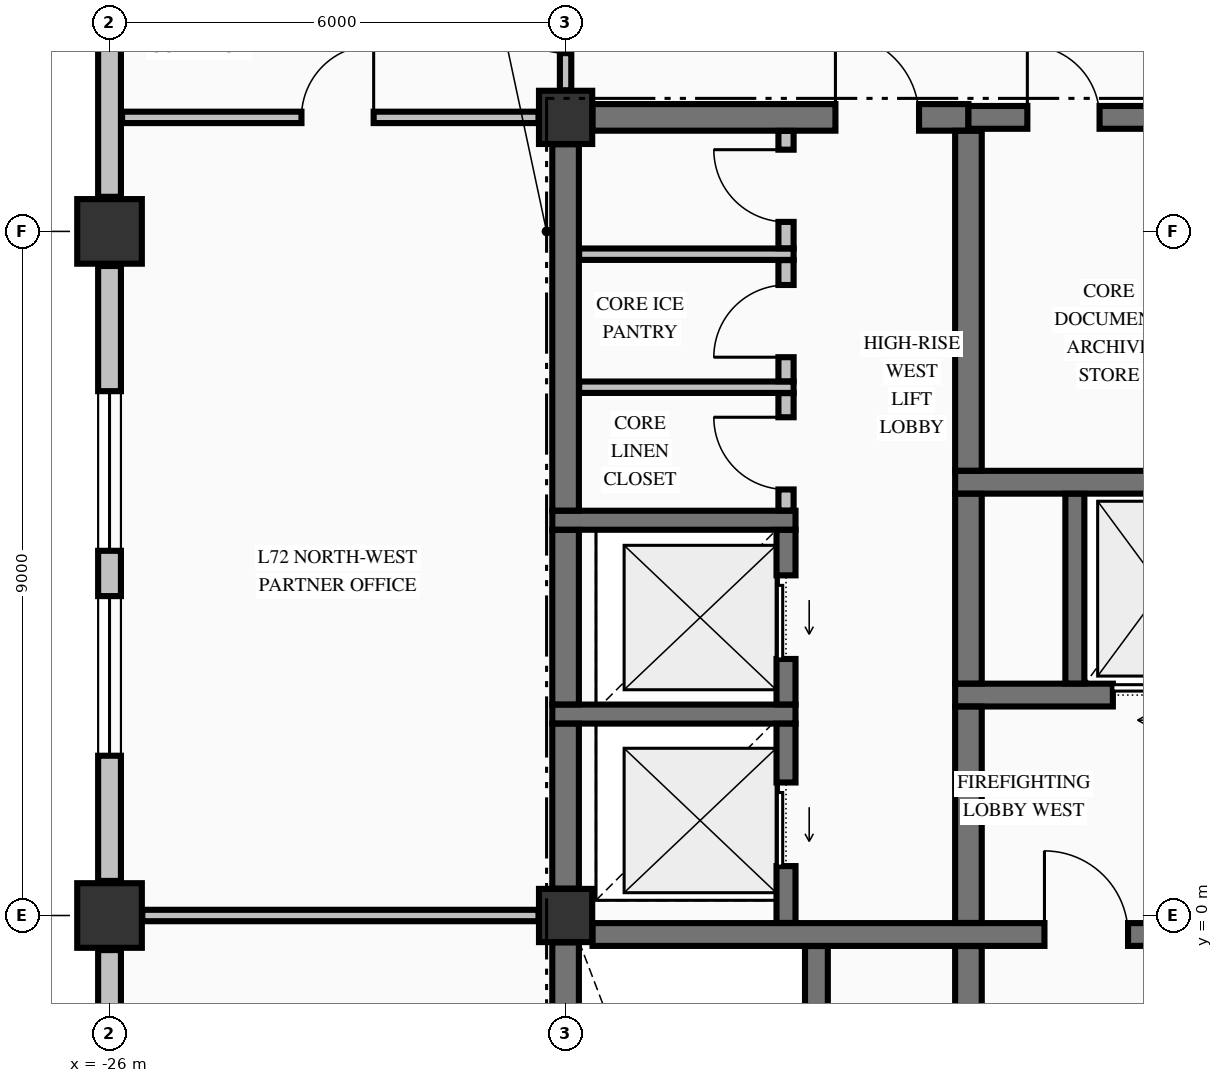
"""IFC4 building model, lengths in metres.
Left out: names, types, materials, properties, quantities, classifications, styles, units other than length and angle.
Written with IfcOpenShell. Run it as: python <this file> out.ifc"""

import sys

from ifc_helpers import new_model, si_unit, direction, frame, frame_2d, origin, origin_2d, place, context, subcontext, project, spatial, rectangle, extrude, element, fill, save


model = new_model("IFC4")
c1 = context("Model", 3, precision=1e-05, world=origin(), true_north=direction((0.0, 1.0)))
c2 = subcontext(c1, "Body", "Model", "MODEL_VIEW")
j1 = project(units=[si_unit("LENGTHUNIT", "METRE"), si_unit("PLANEANGLEUNIT", "RADIAN")], contexts=[c1])
p1 = place(None, origin())
s1 = spatial("IfcSite", under=j1, at=p1, CompositionType="ELEMENT")
p2 = place(p1, origin())
s2 = spatial("IfcBuilding", under=s1, at=p2, CompositionType="ELEMENT")
p3 = place(p2, frame((0.0, 0.0, 270.58)))
s3 = spatial("IfcBuildingStorey", under=s2, at=p3, CompositionType="ELEMENT", Elevation=270.58)
for number, where, z_axis, x_axis in (
    (1, (-26.0, 0.0, -0.325), (0.0, 0.0, 1.0), (1.0, 0.0, 0.0)),
    (2, (-26.0, 9.0, -0.325), (0.0, 0.0, 1.0), (1.0, 0.0, 0.0)),
):
    element("IfcColumn", number, at=place(p3, frame(where, z_axis=z_axis, x_axis=x_axis)), inside=s3, PredefinedType="COLUMN", context=c2, shape_type="SweptSolid", body=[
        extrude(rectangle(XDim=0.85, YDim=0.85, at=origin_2d()), origin(), (0.0, 0.0, 1.0), 3.815),
    ])
for number, where, z_axis, x_axis in (
    (3, (-20.0, 10.5, -0.325), (0.0, 0.0, 1.0), (1.0, 0.0, 0.0)),
    (4, (-20.0, 0.0, -0.325), (0.0, 0.0, 1.0), (1.0, 0.0, 0.0)),
):
    element("IfcColumn", number, at=place(p3, frame(where, z_axis=z_axis, x_axis=x_axis)), inside=s3, PredefinedType="COLUMN", context=c2, shape_type="SweptSolid", body=[
        extrude(rectangle(XDim=0.7, YDim=0.7, at=origin_2d()), origin(), (0.0, 0.0, 1.0), 3.815),
    ])
p4 = place(p3, frame((-26.0, -0.455, 0.0), z_axis=(0.0, 0.0, 1.0), x_axis=(0.0, -1.0, 0.0)))
e5 = element("IfcWall", 5, at=p4, inside=s3, PredefinedType="STANDARD", context=c2, shape_type="SweptSolid", body=[
    extrude(rectangle(XDim=8.09, YDim=0.3, at=frame_2d((4.045, 0.0))), origin(), (0.0, 0.0, 1.0), 2.882),
])
p5 = place(p4, frame((1.647, 0.0, 0.7)))
e6 = element("IfcOpeningElement", 6, at=p5, cuts=e5, PredefinedType="OPENING", context=c2, shape_type="SweptSolid", body=[
    extrude(rectangle(XDim=2.1, YDim=1.5, at=frame_2d((1.05, 0.75))), frame((0.0, 0.16, 0.0), z_axis=(0.0, -1.0, 0.0), x_axis=(1.0, 0.0, 0.0)), (0.0, 0.0, 1.0), 0.32),
])
p6 = place(p4, frame((4.343, 0.0, 0.7)))
e7 = element("IfcOpeningElement", 7, at=p6, cuts=e5, PredefinedType="OPENING", context=c2, shape_type="SweptSolid", body=[
    extrude(rectangle(XDim=2.1, YDim=1.5, at=frame_2d((1.05, 0.75))), frame((0.0, 0.16, 0.0), z_axis=(0.0, -1.0, 0.0), x_axis=(1.0, 0.0, 0.0)), (0.0, 0.0, 1.0), 0.32),
])
p7 = place(p3, frame((-26.0, 8.545, 0.0), z_axis=(0.0, 0.0, 1.0), x_axis=(0.0, -1.0, 0.0)))
e8 = element("IfcWall", 8, at=p7, inside=s3, PredefinedType="STANDARD", context=c2, shape_type="SweptSolid", body=[
    extrude(rectangle(XDim=8.09, YDim=0.3, at=frame_2d((4.045, 0.0))), origin(), (0.0, 0.0, 1.0), 2.882),
])
p8 = place(p7, frame((1.647, 0.0, 0.7)))
e9 = element("IfcOpeningElement", 9, at=p8, cuts=e8, PredefinedType="OPENING", context=c2, shape_type="SweptSolid", body=[
    extrude(rectangle(XDim=2.1, YDim=1.5, at=frame_2d((1.05, 0.75))), frame((0.0, 0.16, 0.0), z_axis=(0.0, -1.0, 0.0), x_axis=(1.0, 0.0, 0.0)), (0.0, 0.0, 1.0), 0.32),
])
p9 = place(p7, frame((4.343, 0.0, 0.7)))
e10 = element("IfcOpeningElement", 10, at=p9, cuts=e8, PredefinedType="OPENING", context=c2, shape_type="SweptSolid", body=[
    extrude(rectangle(XDim=2.1, YDim=1.5, at=frame_2d((1.05, 0.75))), frame((0.0, 0.16, 0.0), z_axis=(0.0, -1.0, 0.0), x_axis=(1.0, 0.0, 0.0)), (0.0, 0.0, 1.0), 0.32),
])
p10 = place(p3, frame((-26.0, 17.545, 0.0), z_axis=(0.0, 0.0, 1.0), x_axis=(0.0, -1.0, 0.0)))
e11 = element("IfcWall", 11, at=p10, inside=s3, PredefinedType="STANDARD", context=c2, shape_type="SweptSolid", body=[
    extrude(rectangle(XDim=8.09, YDim=0.3, at=frame_2d((4.045, 0.0))), origin(), (0.0, 0.0, 1.0), 2.882),
])
p11 = place(p3, frame((-19.646, -0.25, 0.0), z_axis=(0.0, 0.0, 1.0), x_axis=(1.0, 0.0, 0.0)))
e12 = element("IfcWall", 12, at=p11, inside=s3, PredefinedType="SHEAR", context=c2, shape_type="SweptSolid", body=[
    extrude(rectangle(XDim=8.292, YDim=0.3, at=frame_2d((4.146, 0.0))), origin(), (0.0, 0.0, 1.0), 3.49),
])
p12 = place(p11, frame((5.946, 0.0, 0.0)))
e13 = element("IfcOpeningElement", 13, at=p12, cuts=e12, PredefinedType="OPENING", context=c2, shape_type="SweptSolid", body=[
    extrude(rectangle(XDim=1.1, YDim=2.15, at=frame_2d((0.55, 1.075))), frame((0.0, 0.16, 0.0), z_axis=(0.0, -1.0, 0.0), x_axis=(1.0, 0.0, 0.0)), (0.0, 0.0, 1.0), 0.32),
])
p13 = place(p3, frame((-20.175, 2.65, 0.0), z_axis=(0.0, 0.0, 1.0), x_axis=(1.0, 0.0, 0.0)))
e14 = element("IfcWall", 14, at=p13, inside=s3, PredefinedType="SOLIDWALL", context=c2, shape_type="SweptSolid", body=[
    extrude(rectangle(XDim=3.2, YDim=0.25, at=frame_2d((1.6, 0.0))), origin(), (0.0, 0.0, 1.0), 3.49),
])
p14 = place(p3, frame((-14.875, 2.9, 0.0), z_axis=(0.0, 0.0, 1.0), x_axis=(1.0, 0.0, 0.0)))
e15 = element("IfcWall", 15, at=p14, inside=s3, PredefinedType="SHEAR", context=c2, shape_type="SweptSolid", body=[
    extrude(rectangle(XDim=4.025, YDim=0.3, at=frame_2d((2.012, 0.0))), origin(), (0.0, 0.0, 1.0), 3.49),
])
p15 = place(p14, frame((2.075, 0.0, 0.0)))
e16 = element("IfcOpeningElement", 16, at=p15, cuts=e15, PredefinedType="OPENING", context=c2, shape_type="SweptSolid", body=[
    extrude(rectangle(XDim=1.1, YDim=2.2, at=frame_2d((0.55, 1.1))), frame((0.0, 0.16, 0.0), z_axis=(0.0, -1.0, 0.0), x_axis=(1.0, 0.0, 0.0)), (0.0, 0.0, 1.0), 0.32),
])
p16 = place(p3, frame((-20.175, 5.2, 0.0), z_axis=(0.0, 0.0, 1.0), x_axis=(1.0, 0.0, 0.0)))
e17 = element("IfcWall", 17, at=p16, inside=s3, PredefinedType="SOLIDWALL", context=c2, shape_type="SweptSolid", body=[
    extrude(rectangle(XDim=3.2, YDim=0.25, at=frame_2d((1.6, 0.0))), origin(), (0.0, 0.0, 1.0), 3.49),
])
p17 = place(p3, frame((-14.875, 5.7, 0.0), z_axis=(0.0, 0.0, 1.0), x_axis=(1.0, 0.0, 0.0)))
e18 = element("IfcWall", 18, at=p17, inside=s3, PredefinedType="SHEAR", context=c2, shape_type="SweptSolid", body=[
    extrude(rectangle(XDim=4.025, YDim=0.3, at=frame_2d((2.012, 0.0))), origin(), (0.0, 0.0, 1.0), 3.49),
])
p18 = place(p3, frame((-19.646, 10.5, 0.0), z_axis=(0.0, 0.0, 1.0), x_axis=(1.0, 0.0, 0.0)))
e19 = element("IfcWall", 19, at=p18, inside=s3, PredefinedType="SHEAR", context=c2, shape_type="SweptSolid", body=[
    extrude(rectangle(XDim=4.946, YDim=0.35, at=frame_2d((2.473, 0.0))), origin(), (0.0, 0.0, 1.0), 3.49),
])
p19 = place(p18, frame((3.196, 0.0, 0.0)))
e20 = element("IfcOpeningElement", 20, at=p19, cuts=e19, PredefinedType="OPENING", context=c2, shape_type="SweptSolid", body=[
    extrude(rectangle(XDim=1.1, YDim=2.15, at=frame_2d((0.55, 1.075))), frame((0.0, 0.185, 0.0), z_axis=(0.0, -1.0, 0.0), x_axis=(1.0, 0.0, 0.0)), (0.0, 0.0, 1.0), 0.37),
])
p20 = place(p3, frame((-14.7, 10.5, 0.0), z_axis=(0.0, 0.0, 1.0), x_axis=(1.0, 0.0, 0.0)))
e21 = element("IfcWall", 21, at=p20, inside=s3, PredefinedType="SHEAR", context=c2, shape_type="SweptSolid", body=[
    extrude(rectangle(XDim=3.346, YDim=0.3, at=frame_2d((1.673, 0.0))), origin(), (0.0, 0.0, 1.0), 3.49),
])
p21 = place(p20, frame((0.775, 0.0, 0.0)))
e22 = element("IfcOpeningElement", 22, at=p21, cuts=e21, PredefinedType="OPENING", context=c2, shape_type="SweptSolid", body=[
    extrude(rectangle(XDim=0.95, YDim=2.15, at=frame_2d((0.475, 1.075))), frame((0.0, 0.16, 0.0), z_axis=(0.0, -1.0, 0.0), x_axis=(1.0, 0.0, 0.0)), (0.0, 0.0, 1.0), 0.32),
])
p22 = place(p3, frame((-25.569, 0.0, 0.0), z_axis=(0.0, 0.0, 1.0), x_axis=(1.0, 0.0, 0.0)))
e23 = element("IfcWall", 23, at=p22, inside=s3, PredefinedType="PARTITIONING", context=c2, shape_type="SweptSolid", body=[
    extrude(rectangle(XDim=5.213, YDim=0.15, at=frame_2d((2.606, 0.0))), origin(), (0.0, 0.0, 1.0), 3.08),
])
for number, where, z_axis, x_axis in (
    (24, (-19.822, 6.95, 0.0), (0.0, 0.0, 1.0), (1.0, 0.0, 0.0)),
    (25, (-19.822, 8.7, 0.0), (0.0, 0.0, 1.0), (1.0, 0.0, 0.0)),
):
    element("IfcWall", number, at=place(p3, frame(where, z_axis=z_axis, x_axis=x_axis)), inside=s3, PredefinedType="PARTITIONING", context=c2, shape_type="SweptSolid", body=[
        extrude(rectangle(XDim=2.822, YDim=0.15, at=frame_2d((1.411, 0.0))), origin(), (0.0, 0.0, 1.0), 3.49),
    ])
p23 = place(p3, frame((-25.835, 10.5, 0.0), z_axis=(0.0, 0.0, 1.0), x_axis=(1.0, 0.0, 0.0)))
e26 = element("IfcWall", 26, at=p23, inside=s3, PredefinedType="PARTITIONING", context=c2, shape_type="SweptSolid", body=[
    extrude(rectangle(XDim=5.479, YDim=0.15, at=frame_2d((2.74, 0.0))), origin(), (0.0, 0.0, 1.0), 3.49),
])
p24 = place(p23, frame((2.36, 0.0, 0.0)))
e27 = element("IfcOpeningElement", 27, at=p24, cuts=e26, PredefinedType="OPENING", context=c2, shape_type="SweptSolid", body=[
    extrude(rectangle(XDim=0.95, YDim=2.15, at=frame_2d((0.475, 1.075))), frame((0.0, 0.085, 0.0), z_axis=(0.0, -1.0, 0.0), x_axis=(1.0, 0.0, 0.0)), (0.0, 0.0, 1.0), 0.17),
])
p25 = place(p3, frame((-20.0, -9.596, 0.0), z_axis=(0.0, 0.0, 1.0), x_axis=(0.0, 1.0, 0.0)))
e28 = element("IfcWall", 28, at=p25, inside=s3, PredefinedType="SHEAR", context=c2, shape_type="SweptSolid", body=[
    extrude(rectangle(XDim=9.242, YDim=0.35, at=frame_2d((4.621, 0.0))), origin(), (0.0, 0.0, 1.0), 3.49),
])
p26 = place(p3, frame((-20.0, 0.354, 0.0), z_axis=(0.0, 0.0, 1.0), x_axis=(0.0, 1.0, 0.0)))
e29 = element("IfcWall", 29, at=p26, inside=s3, PredefinedType="SHEAR", context=c2, shape_type="SweptSolid", body=[
    extrude(rectangle(XDim=2.169, YDim=0.35, at=frame_2d((1.084, 0.0))), origin(), (0.0, 0.0, 1.0), 3.49),
])
p27 = place(p3, frame((-20.0, 2.777, 0.0), z_axis=(0.0, 0.0, 1.0), x_axis=(0.0, 1.0, 0.0)))
e30 = element("IfcWall", 30, at=p27, inside=s3, PredefinedType="SHEAR", context=c2, shape_type="SweptSolid", body=[
    extrude(rectangle(XDim=2.296, YDim=0.35, at=frame_2d((1.148, 0.0))), origin(), (0.0, 0.0, 1.0), 3.49),
])
p28 = place(p3, frame((-20.0, 5.327, 0.0), z_axis=(0.0, 0.0, 1.0), x_axis=(0.0, 1.0, 0.0)))
e31 = element("IfcWall", 31, at=p28, inside=s3, PredefinedType="SHEAR", context=c2, shape_type="SweptSolid", body=[
    extrude(rectangle(XDim=4.819, YDim=0.35, at=frame_2d((2.41, 0.0))), origin(), (0.0, 0.0, 1.0), 3.49),
])
p29 = place(p3, frame((-17.1, -0.098, 0.0), z_axis=(0.0, 0.0, 1.0), x_axis=(0.0, 1.0, 0.0)))
e32 = element("IfcWall", 32, at=p29, inside=s3, PredefinedType="SOLIDWALL", context=c2, shape_type="SweptSolid", body=[
    extrude(rectangle(XDim=2.621, YDim=0.25, at=frame_2d((1.311, 0.0))), origin(), (0.0, 0.0, 1.0), 3.49),
])
p30 = place(p29, frame((0.748, 0.0, 0.0)))
e33 = element("IfcOpeningElement", 33, at=p30, cuts=e32, PredefinedType="OPENING", context=c2, shape_type="SweptSolid", body=[
    extrude(rectangle(XDim=1.1, YDim=2.2, at=frame_2d((0.55, 1.1))), frame((0.0, 0.135, 0.0), z_axis=(0.0, -1.0, 0.0), x_axis=(1.0, 0.0, 0.0)), (0.0, 0.0, 1.0), 0.27),
])
p31 = place(p3, frame((-17.1, 2.777, 0.0), z_axis=(0.0, 0.0, 1.0), x_axis=(0.0, 1.0, 0.0)))
e34 = element("IfcWall", 34, at=p31, inside=s3, PredefinedType="SOLIDWALL", context=c2, shape_type="SweptSolid", body=[
    extrude(rectangle(XDim=2.296, YDim=0.25, at=frame_2d((1.148, 0.0))), origin(), (0.0, 0.0, 1.0), 3.49),
])
p32 = place(p31, frame((0.598, 0.0, 0.0)))
e35 = element("IfcOpeningElement", 35, at=p32, cuts=e34, PredefinedType="OPENING", context=c2, shape_type="SweptSolid", body=[
    extrude(rectangle(XDim=1.1, YDim=2.2, at=frame_2d((0.55, 1.1))), frame((0.0, 0.135, 0.0), z_axis=(0.0, -1.0, 0.0), x_axis=(1.0, 0.0, 0.0)), (0.0, 0.0, 1.0), 0.27),
])
p33 = place(p3, frame((-16.7, -9.773, 0.0), z_axis=(0.0, 0.0, 1.0), x_axis=(0.0, 1.0, 0.0)))
e36 = element("IfcWall", 36, at=p33, inside=s3, PredefinedType="SHEAR", context=c2, shape_type="SweptSolid", body=[
    extrude(rectangle(XDim=9.371, YDim=0.3, at=frame_2d((4.686, 0.0))), origin(), (0.0, 0.0, 1.0), 3.49),
])
p34 = place(p3, frame((-14.7, -9.773, 0.0), z_axis=(0.0, 0.0, 1.0), x_axis=(0.0, 1.0, 0.0)))
e37 = element("IfcWall", 37, at=p34, inside=s3, PredefinedType="SHEAR", context=c2, shape_type="SweptSolid", body=[
    extrude(rectangle(XDim=9.371, YDim=0.35, at=frame_2d((4.686, 0.0))), origin(), (0.0, 0.0, 1.0), 3.49),
])
p35 = place(p3, frame((-14.7, -0.098, 0.0), z_axis=(0.0, 0.0, 1.0), x_axis=(0.0, 1.0, 0.0)))
e38 = element("IfcWall", 38, at=p35, inside=s3, PredefinedType="SHEAR", context=c2, shape_type="SweptSolid", body=[
    extrude(rectangle(XDim=2.846, YDim=0.35, at=frame_2d((1.423, 0.0))), origin(), (0.0, 0.0, 1.0), 3.49),
])
p36 = place(p3, frame((-14.7, 3.052, 0.0), z_axis=(0.0, 0.0, 1.0), x_axis=(0.0, 1.0, 0.0)))
e39 = element("IfcWall", 39, at=p36, inside=s3, PredefinedType="SHEAR", context=c2, shape_type="SweptSolid", body=[
    extrude(rectangle(XDim=2.496, YDim=0.35, at=frame_2d((1.248, 0.0))), origin(), (0.0, 0.0, 1.0), 3.49),
])
p37 = place(p3, frame((-14.7, 5.852, 0.0), z_axis=(0.0, 0.0, 1.0), x_axis=(0.0, 1.0, 0.0)))
e40 = element("IfcWall", 40, at=p37, inside=s3, PredefinedType="SHEAR", context=c2, shape_type="SweptSolid", body=[
    extrude(rectangle(XDim=4.471, YDim=0.35, at=frame_2d((2.235, 0.0))), origin(), (0.0, 0.0, 1.0), 3.49),
])
p38 = place(p3, frame((-13.3, 3.052, 0.0), z_axis=(0.0, 0.0, 1.0), x_axis=(0.0, 1.0, 0.0)))
e41 = element("IfcWall", 41, at=p38, inside=s3, PredefinedType="SOLIDWALL", context=c2, shape_type="SweptSolid", body=[
    extrude(rectangle(XDim=2.496, YDim=0.25, at=frame_2d((1.248, 0.0))), origin(), (0.0, 0.0, 1.0), 3.49),
])
p39 = place(p3, frame((-20.0, 10.856, 0.0), z_axis=(0.0, 0.0, 1.0), x_axis=(0.0, 1.0, 0.0)))
e42 = element("IfcWall", 42, at=p39, inside=s3, PredefinedType="PARTITIONING", context=c2, shape_type="SweptSolid", body=[
    extrude(rectangle(XDim=2.216, YDim=0.15, at=frame_2d((1.108, 0.0))), origin(), (0.0, 0.0, 1.0), 3.49),
])
p40 = place(p39, frame((0.489, 0.0, 0.0)))
e43 = element("IfcOpeningElement", 43, at=p40, cuts=e42, PredefinedType="OPENING", context=c2, shape_type="SweptSolid", body=[
    extrude(rectangle(XDim=0.95, YDim=2.15, at=frame_2d((0.475, 1.075))), frame((0.0, 0.085, 0.0), z_axis=(0.0, -1.0, 0.0), x_axis=(1.0, 0.0, 0.0)), (0.0, 0.0, 1.0), 0.17),
])
p41 = place(p3, frame((-17.1, 5.328, 0.0), z_axis=(0.0, 0.0, 1.0), x_axis=(0.0, 1.0, 0.0)))
e44 = element("IfcWall", 44, at=p41, inside=s3, PredefinedType="PARTITIONING", context=c2, shape_type="SweptSolid", body=[
    extrude(rectangle(XDim=1.544, YDim=0.2, at=frame_2d((0.772, 0.0))), origin(), (0.0, 0.0, 1.0), 3.49),
])
p42 = place(p41, frame((0.277, 0.0, 0.0)))
e45 = element("IfcOpeningElement", 45, at=p42, cuts=e44, PredefinedType="OPENING", context=c2, shape_type="SweptSolid", body=[
    extrude(rectangle(XDim=0.95, YDim=2.15, at=frame_2d((0.475, 1.075))), frame((0.0, 0.11, 0.0), z_axis=(0.0, -1.0, 0.0), x_axis=(1.0, 0.0, 0.0)), (0.0, 0.0, 1.0), 0.22),
])
p43 = place(p3, frame((-17.1, 7.028, 0.0), z_axis=(0.0, 0.0, 1.0), x_axis=(0.0, 1.0, 0.0)))
e46 = element("IfcWall", 46, at=p43, inside=s3, PredefinedType="PARTITIONING", context=c2, shape_type="SweptSolid", body=[
    extrude(rectangle(XDim=1.594, YDim=0.2, at=frame_2d((0.797, 0.0))), origin(), (0.0, 0.0, 1.0), 3.49),
])
p44 = place(p43, frame((0.317, 0.0, 0.0)))
e47 = element("IfcOpeningElement", 47, at=p44, cuts=e46, PredefinedType="OPENING", context=c2, shape_type="SweptSolid", body=[
    extrude(rectangle(XDim=0.95, YDim=2.15, at=frame_2d((0.475, 1.075))), frame((0.0, 0.11, 0.0), z_axis=(0.0, -1.0, 0.0), x_axis=(1.0, 0.0, 0.0)), (0.0, 0.0, 1.0), 0.22),
])
p45 = place(p3, frame((-17.1, 8.778, 0.0), z_axis=(0.0, 0.0, 1.0), x_axis=(0.0, 1.0, 0.0)))
e48 = element("IfcWall", 48, at=p45, inside=s3, PredefinedType="PARTITIONING", context=c2, shape_type="SweptSolid", body=[
    extrude(rectangle(XDim=1.544, YDim=0.2, at=frame_2d((0.772, 0.0))), origin(), (0.0, 0.0, 1.0), 3.49),
])
p46 = place(p45, frame((0.347, 0.0, 0.0)))
e49 = element("IfcOpeningElement", 49, at=p46, cuts=e48, PredefinedType="OPENING", context=c2, shape_type="SweptSolid", body=[
    extrude(rectangle(XDim=0.95, YDim=2.15, at=frame_2d((0.475, 1.075))), frame((0.0, 0.11, 0.0), z_axis=(0.0, -1.0, 0.0), x_axis=(1.0, 0.0, 0.0)), (0.0, 0.0, 1.0), 0.22),
])
p47 = place(p8, origin())
e50 = element("IfcWindow", 50, at=p47, inside=s3, PartitioningType="SINGLE_PANEL", PredefinedType="WINDOW", context=c2, shape_type="SweptSolid", body=[
    extrude(rectangle(XDim=2.1, YDim=1.5, at=frame_2d((1.05, 0.75))), frame((0.0, 0.03, 0.0), z_axis=(0.0, -1.0, 0.0), x_axis=(1.0, 0.0, 0.0)), (0.0, 0.0, 1.0), 0.06),
])
fill(e9, e50)
p48 = place(p9, origin())
e51 = element("IfcWindow", 51, at=p48, inside=s3, PartitioningType="SINGLE_PANEL", PredefinedType="WINDOW", context=c2, shape_type="SweptSolid", body=[
    extrude(rectangle(XDim=2.1, YDim=1.5, at=frame_2d((1.05, 0.75))), frame((0.0, 0.03, 0.0), z_axis=(0.0, -1.0, 0.0), x_axis=(1.0, 0.0, 0.0)), (0.0, 0.0, 1.0), 0.06),
])
fill(e10, e51)
p49 = place(p12, origin())
e52 = element("IfcDoor", 52, at=p49, inside=s3, OperationType="SINGLE_SWING_LEFT", PredefinedType="DOOR", context=c2, shape_type="SweptSolid", body=[
    extrude(rectangle(XDim=1.1, YDim=2.15, at=frame_2d((0.55, 1.075))), frame((0.0, 0.025, 0.0), z_axis=(0.0, -1.0, 0.0), x_axis=(1.0, 0.0, 0.0)), (0.0, 0.0, 1.0), 0.05),
])
fill(e13, e52)
p50 = place(p15, origin())
e53 = element("IfcDoor", 53, at=p50, inside=s3, OperationType="SLIDING_TO_LEFT", PredefinedType="DOOR", context=c2, shape_type="SweptSolid", body=[
    extrude(rectangle(XDim=1.1, YDim=2.2, at=frame_2d((0.55, 1.1))), frame((0.0, 0.025, 0.0), z_axis=(0.0, -1.0, 0.0), x_axis=(1.0, 0.0, 0.0)), (0.0, 0.0, 1.0), 0.05),
])
fill(e16, e53)
p51 = place(p21, origin())
e54 = element("IfcDoor", 54, at=p51, inside=s3, OperationType="SINGLE_SWING_LEFT", PredefinedType="DOOR", context=c2, shape_type="SweptSolid", body=[
    extrude(rectangle(XDim=0.95, YDim=2.15, at=frame_2d((0.475, 1.075))), frame((0.0, 0.025, 0.0), z_axis=(0.0, -1.0, 0.0), x_axis=(1.0, 0.0, 0.0)), (0.0, 0.0, 1.0), 0.05),
])
fill(e22, e54)
p52 = place(p30, origin())
e55 = element("IfcDoor", 55, at=p52, inside=s3, OperationType="SLIDING_TO_LEFT", PredefinedType="DOOR", context=c2, shape_type="SweptSolid", body=[
    extrude(rectangle(XDim=1.1, YDim=2.2, at=frame_2d((0.55, 1.1))), frame((0.0, 0.025, 0.0), z_axis=(0.0, -1.0, 0.0), x_axis=(1.0, 0.0, 0.0)), (0.0, 0.0, 1.0), 0.05),
])
fill(e33, e55)
p53 = place(p32, origin())
e56 = element("IfcDoor", 56, at=p53, inside=s3, OperationType="SLIDING_TO_LEFT", PredefinedType="DOOR", context=c2, shape_type="SweptSolid", body=[
    extrude(rectangle(XDim=1.1, YDim=2.2, at=frame_2d((0.55, 1.1))), frame((0.0, 0.025, 0.0), z_axis=(0.0, -1.0, 0.0), x_axis=(1.0, 0.0, 0.0)), (0.0, 0.0, 1.0), 0.05),
])
fill(e35, e56)
p54 = place(p19, origin())
e57 = element("IfcDoor", 57, at=p54, inside=s3, OperationType="SINGLE_SWING_LEFT", PredefinedType="DOOR", context=c2, shape_type="SweptSolid", body=[
    extrude(rectangle(XDim=1.1, YDim=2.15, at=frame_2d((0.55, 1.075))), frame((0.0, 0.025, 0.0), z_axis=(0.0, -1.0, 0.0), x_axis=(1.0, 0.0, 0.0)), (0.0, 0.0, 1.0), 0.05),
])
fill(e20, e57)
p55 = place(p46, origin())
e58 = element("IfcDoor", 58, at=p55, inside=s3, OperationType="SINGLE_SWING_RIGHT", PredefinedType="DOOR", context=c2, shape_type="SweptSolid", body=[
    extrude(rectangle(XDim=0.95, YDim=2.15, at=frame_2d((0.475, 1.075))), frame((0.0, 0.025, 0.0), z_axis=(0.0, -1.0, 0.0), x_axis=(1.0, 0.0, 0.0)), (0.0, 0.0, 1.0), 0.05),
])
fill(e49, e58)
p56 = place(p44, origin())
e59 = element("IfcDoor", 59, at=p56, inside=s3, OperationType="SINGLE_SWING_LEFT", PredefinedType="DOOR", context=c2, shape_type="SweptSolid", body=[
    extrude(rectangle(XDim=0.95, YDim=2.15, at=frame_2d((0.475, 1.075))), frame((0.0, 0.025, 0.0), z_axis=(0.0, -1.0, 0.0), x_axis=(1.0, 0.0, 0.0)), (0.0, 0.0, 1.0), 0.05),
])
fill(e47, e59)
p57 = place(p42, origin())
e60 = element("IfcDoor", 60, at=p57, inside=s3, OperationType="SINGLE_SWING_RIGHT", PredefinedType="DOOR", context=c2, shape_type="SweptSolid", body=[
    extrude(rectangle(XDim=0.95, YDim=2.15, at=frame_2d((0.475, 1.075))), frame((0.0, 0.025, 0.0), z_axis=(0.0, -1.0, 0.0), x_axis=(1.0, 0.0, 0.0)), (0.0, 0.0, 1.0), 0.05),
])
fill(e45, e60)
p58 = place(p40, origin())
e61 = element("IfcDoor", 61, at=p58, inside=s3, OperationType="SINGLE_SWING_RIGHT", PredefinedType="DOOR", context=c2, shape_type="SweptSolid", body=[
    extrude(rectangle(XDim=0.95, YDim=2.15, at=frame_2d((0.475, 1.075))), frame((0.0, 0.025, 0.0), z_axis=(0.0, -1.0, 0.0), x_axis=(1.0, 0.0, 0.0)), (0.0, 0.0, 1.0), 0.05),
])
fill(e43, e61)
p59 = place(p24, origin())
e62 = element("IfcDoor", 62, at=p59, inside=s3, OperationType="SINGLE_SWING_RIGHT", PredefinedType="DOOR", context=c2, shape_type="SweptSolid", body=[
    extrude(rectangle(XDim=0.95, YDim=2.15, at=frame_2d((0.475, 1.075))), frame((0.0, 0.025, 0.0), z_axis=(0.0, -1.0, 0.0), x_axis=(1.0, 0.0, 0.0)), (0.0, 0.0, 1.0), 0.05),
])
fill(e27, e62)
save(model, sys.argv[1])
